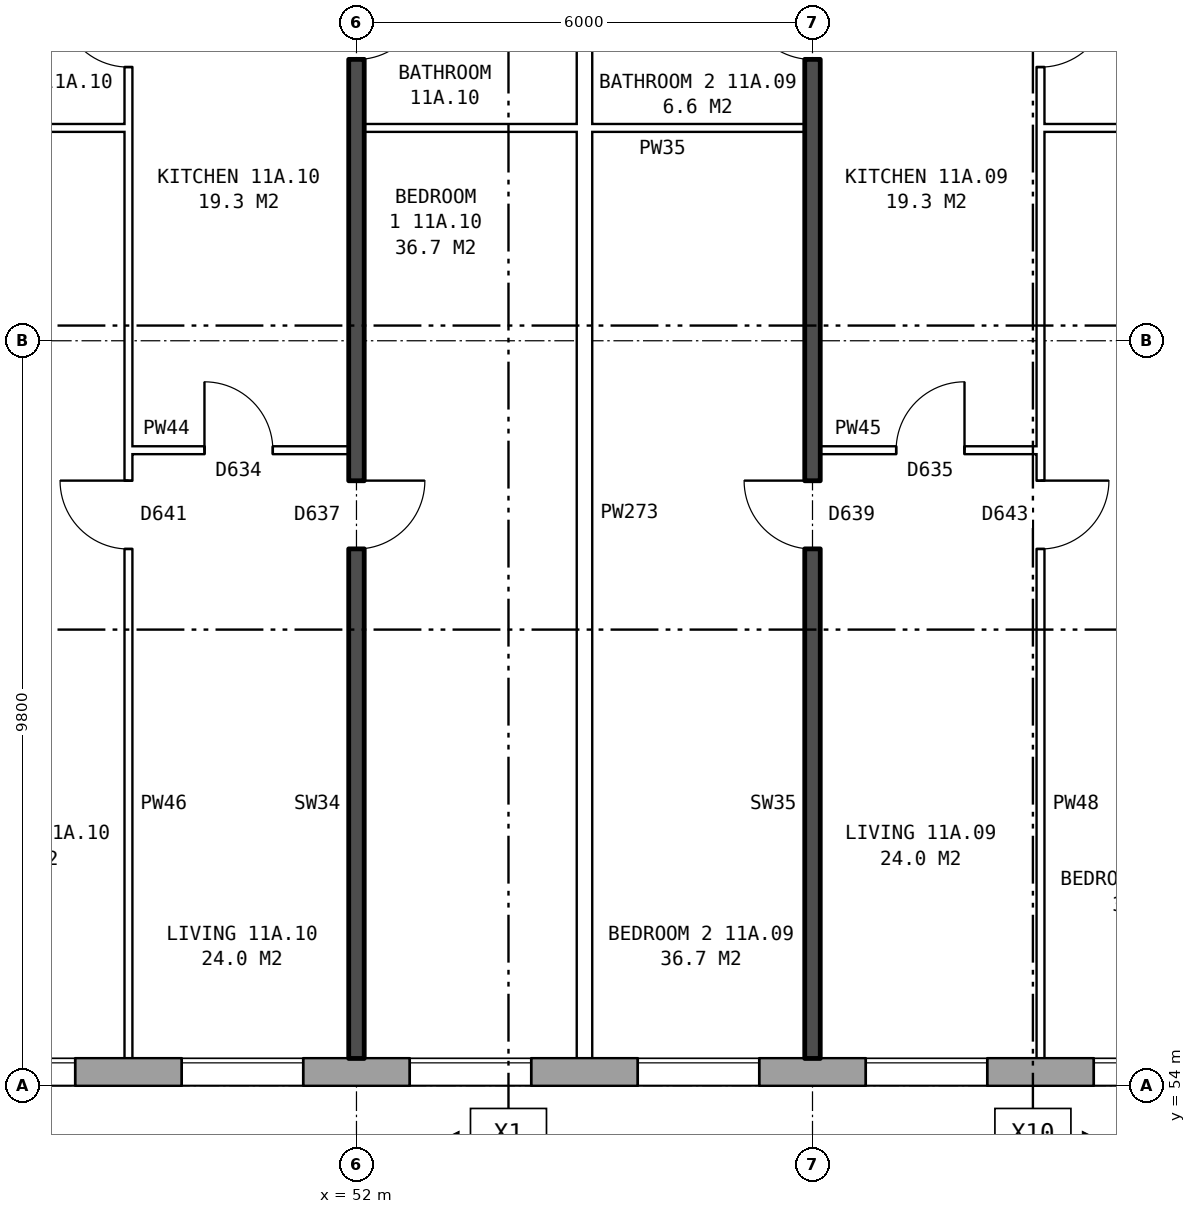
"""IFC4 building model, lengths in metres.
Left out: names, types, materials, properties, quantities, classifications, styles, units other than length and angle.
Written with IfcOpenShell. Run it as: python <this file> out.ifc"""

import sys

from ifc_helpers import new_model, si_unit, direction, frame, frame_2d, origin, place, context, subcontext, project, spatial, rectangle, extrude, element, fill, save


model = new_model("IFC4")
c1 = context("Model", 3, precision=1e-05, world=origin(), true_north=direction((0.0, 1.0)))
c2 = subcontext(c1, "Body", "Model", "MODEL_VIEW")
j1 = project(units=[si_unit("LENGTHUNIT", "METRE"), si_unit("PLANEANGLEUNIT", "RADIAN")], contexts=[c1])
p1 = place(None, origin())
s1 = spatial("IfcSite", under=j1, at=p1, CompositionType="ELEMENT")
p2 = place(p1, origin())
s2 = spatial("IfcBuilding", under=s1, at=p2, CompositionType="ELEMENT")
p3 = place(p2, frame((0.0, 0.0, 44.3)))
s3 = spatial("IfcBuildingStorey", under=s2, at=p3, CompositionType="ELEMENT", Elevation=44.3)
p4 = place(p3, frame((24.575, 54.18, 0.0), z_axis=(0.0, 0.0, 1.0), x_axis=(1.0, 0.0, 0.0)))
e1 = element("IfcWall", 1, at=p4, inside=s3, PredefinedType="STANDARD", context=c2, shape_type="SweptSolid", body=[
    extrude(rectangle(XDim=48.351, YDim=0.36, at=frame_2d((24.175, 0.0))), origin(), (0.0, 0.0, 1.0), 2.85),
])
p5 = place(p4, frame((0.65, 0.0, 0.8)))
e2 = element("IfcOpeningElement", 2, at=p5, cuts=e1, PredefinedType="OPENING", context=c2, shape_type="SweptSolid", body=[
    extrude(rectangle(XDim=1.0, YDim=0.9, at=frame_2d((0.5, 0.45))), frame((0.0, 0.19, 0.0), z_axis=(0.0, -1.0, 0.0), x_axis=(1.0, 0.0, 0.0)), (0.0, 0.0, 1.0), 0.38),
])
p6 = place(p4, frame((4.125, 0.0, 0.8)))
e3 = element("IfcOpeningElement", 3, at=p6, cuts=e1, PredefinedType="OPENING", context=c2, shape_type="SweptSolid", body=[
    extrude(rectangle(XDim=1.6, YDim=1.8, at=frame_2d((0.8, 0.9))), frame((0.0, 0.19, 0.0), z_axis=(0.0, -1.0, 0.0), x_axis=(1.0, 0.0, 0.0)), (0.0, 0.0, 1.0), 0.38),
])
p7 = place(p4, frame((7.125, 0.0, 0.8)))
e4 = element("IfcOpeningElement", 4, at=p7, cuts=e1, PredefinedType="OPENING", context=c2, shape_type="SweptSolid", body=[
    extrude(rectangle(XDim=1.6, YDim=1.8, at=frame_2d((0.8, 0.9))), frame((0.0, 0.19, 0.0), z_axis=(0.0, -1.0, 0.0), x_axis=(1.0, 0.0, 0.0)), (0.0, 0.0, 1.0), 0.38),
])
p8 = place(p4, frame((10.125, 0.0, 0.8)))
e5 = element("IfcOpeningElement", 5, at=p8, cuts=e1, PredefinedType="OPENING", context=c2, shape_type="SweptSolid", body=[
    extrude(rectangle(XDim=1.6, YDim=1.8, at=frame_2d((0.8, 0.9))), frame((0.0, 0.19, 0.0), z_axis=(0.0, -1.0, 0.0), x_axis=(1.0, 0.0, 0.0)), (0.0, 0.0, 1.0), 0.38),
])
p9 = place(p4, frame((13.125, 0.0, 0.8)))
e6 = element("IfcOpeningElement", 6, at=p9, cuts=e1, PredefinedType="OPENING", context=c2, shape_type="SweptSolid", body=[
    extrude(rectangle(XDim=1.6, YDim=1.8, at=frame_2d((0.8, 0.9))), frame((0.0, 0.19, 0.0), z_axis=(0.0, -1.0, 0.0), x_axis=(1.0, 0.0, 0.0)), (0.0, 0.0, 1.0), 0.38),
])
p10 = place(p4, frame((16.125, 0.0, 0.8)))
e7 = element("IfcOpeningElement", 7, at=p10, cuts=e1, PredefinedType="OPENING", context=c2, shape_type="SweptSolid", body=[
    extrude(rectangle(XDim=1.6, YDim=1.8, at=frame_2d((0.8, 0.9))), frame((0.0, 0.19, 0.0), z_axis=(0.0, -1.0, 0.0), x_axis=(1.0, 0.0, 0.0)), (0.0, 0.0, 1.0), 0.38),
])
p11 = place(p4, frame((19.125, 0.0, 0.8)))
e8 = element("IfcOpeningElement", 8, at=p11, cuts=e1, PredefinedType="OPENING", context=c2, shape_type="SweptSolid", body=[
    extrude(rectangle(XDim=1.6, YDim=1.8, at=frame_2d((0.8, 0.9))), frame((0.0, 0.19, 0.0), z_axis=(0.0, -1.0, 0.0), x_axis=(1.0, 0.0, 0.0)), (0.0, 0.0, 1.0), 0.38),
])
p12 = place(p4, frame((22.125, 0.0, 0.8)))
e9 = element("IfcOpeningElement", 9, at=p12, cuts=e1, PredefinedType="OPENING", context=c2, shape_type="SweptSolid", body=[
    extrude(rectangle(XDim=1.6, YDim=1.8, at=frame_2d((0.8, 0.9))), frame((0.0, 0.19, 0.0), z_axis=(0.0, -1.0, 0.0), x_axis=(1.0, 0.0, 0.0)), (0.0, 0.0, 1.0), 0.38),
])
p13 = place(p4, frame((25.125, 0.0, 0.8)))
e10 = element("IfcOpeningElement", 10, at=p13, cuts=e1, PredefinedType="OPENING", context=c2, shape_type="SweptSolid", body=[
    extrude(rectangle(XDim=1.6, YDim=1.8, at=frame_2d((0.8, 0.9))), frame((0.0, 0.19, 0.0), z_axis=(0.0, -1.0, 0.0), x_axis=(1.0, 0.0, 0.0)), (0.0, 0.0, 1.0), 0.38),
])
p14 = place(p4, frame((28.125, 0.0, 0.8)))
e11 = element("IfcOpeningElement", 11, at=p14, cuts=e1, PredefinedType="OPENING", context=c2, shape_type="SweptSolid", body=[
    extrude(rectangle(XDim=1.6, YDim=1.8, at=frame_2d((0.8, 0.9))), frame((0.0, 0.19, 0.0), z_axis=(0.0, -1.0, 0.0), x_axis=(1.0, 0.0, 0.0)), (0.0, 0.0, 1.0), 0.38),
])
p15 = place(p4, frame((31.125, 0.0, 0.8)))
e12 = element("IfcOpeningElement", 12, at=p15, cuts=e1, PredefinedType="OPENING", context=c2, shape_type="SweptSolid", body=[
    extrude(rectangle(XDim=1.6, YDim=1.8, at=frame_2d((0.8, 0.9))), frame((0.0, 0.19, 0.0), z_axis=(0.0, -1.0, 0.0), x_axis=(1.0, 0.0, 0.0)), (0.0, 0.0, 1.0), 0.38),
])
p16 = place(p4, frame((34.125, 0.0, 0.8)))
e13 = element("IfcOpeningElement", 13, at=p16, cuts=e1, PredefinedType="OPENING", context=c2, shape_type="SweptSolid", body=[
    extrude(rectangle(XDim=1.6, YDim=1.8, at=frame_2d((0.8, 0.9))), frame((0.0, 0.19, 0.0), z_axis=(0.0, -1.0, 0.0), x_axis=(1.0, 0.0, 0.0)), (0.0, 0.0, 1.0), 0.38),
])
p17 = place(p4, frame((37.125, 0.0, 0.8)))
e14 = element("IfcOpeningElement", 14, at=p17, cuts=e1, PredefinedType="OPENING", context=c2, shape_type="SweptSolid", body=[
    extrude(rectangle(XDim=1.6, YDim=1.8, at=frame_2d((0.8, 0.9))), frame((0.0, 0.19, 0.0), z_axis=(0.0, -1.0, 0.0), x_axis=(1.0, 0.0, 0.0)), (0.0, 0.0, 1.0), 0.38),
])
p18 = place(p4, frame((40.125, 0.0, 0.8)))
e15 = element("IfcOpeningElement", 15, at=p18, cuts=e1, PredefinedType="OPENING", context=c2, shape_type="SweptSolid", body=[
    extrude(rectangle(XDim=1.6, YDim=1.8, at=frame_2d((0.8, 0.9))), frame((0.0, 0.19, 0.0), z_axis=(0.0, -1.0, 0.0), x_axis=(1.0, 0.0, 0.0)), (0.0, 0.0, 1.0), 0.38),
])
p19 = place(p4, frame((43.125, 0.0, 0.8)))
e16 = element("IfcOpeningElement", 16, at=p19, cuts=e1, PredefinedType="OPENING", context=c2, shape_type="SweptSolid", body=[
    extrude(rectangle(XDim=1.6, YDim=1.8, at=frame_2d((0.8, 0.9))), frame((0.0, 0.19, 0.0), z_axis=(0.0, -1.0, 0.0), x_axis=(1.0, 0.0, 0.0)), (0.0, 0.0, 1.0), 0.38),
])
p20 = place(p4, frame((45.625, 0.0, 0.8)))
e17 = element("IfcOpeningElement", 17, at=p20, cuts=e1, PredefinedType="OPENING", context=c2, shape_type="SweptSolid", body=[
    extrude(rectangle(XDim=1.0, YDim=1.5, at=frame_2d((0.5, 0.75))), frame((0.0, 0.19, 0.0), z_axis=(0.0, -1.0, 0.0), x_axis=(1.0, 0.0, 0.0)), (0.0, 0.0, 1.0), 0.38),
])
p21 = place(p4, frame((2.0, 0.0, 0.8)))
e18 = element("IfcOpeningElement", 18, at=p21, cuts=e1, PredefinedType="OPENING", context=c2, shape_type="SweptSolid", body=[
    extrude(rectangle(XDim=1.2, YDim=1.8, at=frame_2d((0.6, 0.9))), frame((0.0, 0.19, 0.0), z_axis=(0.0, -1.0, 0.0), x_axis=(1.0, 0.0, 0.0)), (0.0, 0.0, 1.0), 0.38),
])
p22 = place(p4, frame((46.925, 0.0, 0.8)))
e19 = element("IfcOpeningElement", 19, at=p22, cuts=e1, PredefinedType="OPENING", context=c2, shape_type="SweptSolid", body=[
    extrude(rectangle(XDim=0.6, YDim=0.9, at=frame_2d((0.3, 0.45))), frame((0.0, 0.19, 0.0), z_axis=(0.0, -1.0, 0.0), x_axis=(1.0, 0.0, 0.0)), (0.0, 0.0, 1.0), 0.38),
])
p23 = place(p3, frame((49.0, 62.36, 0.0), z_axis=(0.0, 0.0, 1.0), x_axis=(1.0, 0.0, 0.0)))
e20 = element("IfcWall", 20, at=p23, inside=s3, PredefinedType="PARTITIONING", context=c2, shape_type="SweptSolid", body=[
    extrude(rectangle(XDim=2.9, YDim=0.1, at=frame_2d((1.45, 0.0))), origin(), (0.0, 0.0, 1.0), 2.85),
])
p24 = place(p23, frame((1.0, 0.0, 0.0)))
e21 = element("IfcOpeningElement", 21, at=p24, cuts=e20, PredefinedType="OPENING", context=c2, shape_type="SweptSolid", body=[
    extrude(rectangle(XDim=0.9, YDim=2.1, at=frame_2d((0.45, 1.05))), frame((0.0, 0.06, 0.0), z_axis=(0.0, -1.0, 0.0), x_axis=(1.0, 0.0, 0.0)), (0.0, 0.0, 1.0), 0.12),
])
p25 = place(p3, frame((58.1, 62.36, 0.0), z_axis=(0.0, 0.0, 1.0), x_axis=(1.0, 0.0, 0.0)))
e22 = element("IfcWall", 22, at=p25, inside=s3, PredefinedType="PARTITIONING", context=c2, shape_type="SweptSolid", body=[
    extrude(rectangle(XDim=2.9, YDim=0.1, at=frame_2d((1.45, 0.0))), origin(), (0.0, 0.0, 1.0), 2.85),
])
p26 = place(p25, frame((1.0, 0.0, 0.0)))
e23 = element("IfcOpeningElement", 23, at=p26, cuts=e22, PredefinedType="OPENING", context=c2, shape_type="SweptSolid", body=[
    extrude(rectangle(XDim=0.9, YDim=2.1, at=frame_2d((0.45, 1.05))), frame((0.0, 0.06, 0.0), z_axis=(0.0, -1.0, 0.0), x_axis=(1.0, 0.0, 0.0)), (0.0, 0.0, 1.0), 0.12),
])
p27 = place(p3, frame((46.1, 66.6, 0.0), z_axis=(0.0, 0.0, 1.0), x_axis=(1.0, 0.0, 0.0)))
e24 = element("IfcWall", 24, at=p27, inside=s3, PredefinedType="PARTITIONING", context=c2, shape_type="SweptSolid", body=[
    extrude(rectangle(XDim=2.9, YDim=0.1, at=frame_2d((1.45, 0.0))), origin(), (0.0, 0.0, 1.0), 2.85),
])
p28 = place(p3, frame((52.1, 66.6, 0.0), z_axis=(0.0, 0.0, 1.0), x_axis=(1.0, 0.0, 0.0)))
e25 = element("IfcWall", 25, at=p28, inside=s3, PredefinedType="PARTITIONING", context=c2, shape_type="SweptSolid", body=[
    extrude(rectangle(XDim=5.8, YDim=0.1, at=frame_2d((2.9, 0.0))), origin(), (0.0, 0.0, 1.0), 2.85),
])
p29 = place(p3, frame((61.0, 66.6, 0.0), z_axis=(0.0, 0.0, 1.0), x_axis=(1.0, 0.0, 0.0)))
e26 = element("IfcWall", 26, at=p29, inside=s3, PredefinedType="PARTITIONING", context=c2, shape_type="SweptSolid", body=[
    extrude(rectangle(XDim=2.64, YDim=0.1, at=frame_2d((1.32, 0.0))), origin(), (0.0, 0.0, 1.0), 2.85),
])
p30 = place(p3, frame((49.0, 54.36, 0.0), z_axis=(0.0, 0.0, 1.0), x_axis=(0.0, 1.0, 0.0)))
e27 = element("IfcWall", 27, at=p30, inside=s3, PredefinedType="PARTITIONING", context=c2, shape_type="SweptSolid", body=[
    extrude(rectangle(XDim=14.34, YDim=0.1, at=frame_2d((7.17, 0.0))), origin(), (0.0, 0.0, 1.0), 2.85),
])
p31 = place(p30, frame((6.7, 0.0, 0.0)))
e28 = element("IfcOpeningElement", 28, at=p31, cuts=e27, PredefinedType="OPENING", context=c2, shape_type="SweptSolid", body=[
    extrude(rectangle(XDim=0.9, YDim=2.1, at=frame_2d((0.45, 1.05))), frame((0.0, 0.06, 0.0), z_axis=(0.0, -1.0, 0.0), x_axis=(1.0, 0.0, 0.0)), (0.0, 0.0, 1.0), 0.12),
])
p32 = place(p30, frame((13.04, 0.0, 0.0)))
e29 = element("IfcOpeningElement", 29, at=p32, cuts=e27, PredefinedType="OPENING", context=c2, shape_type="SweptSolid", body=[
    extrude(rectangle(XDim=0.9, YDim=2.1, at=frame_2d((0.45, 1.05))), frame((0.0, 0.06, 0.0), z_axis=(0.0, -1.0, 0.0), x_axis=(1.0, 0.0, 0.0)), (0.0, 0.0, 1.0), 0.12),
])
p33 = place(p3, frame((52.0, 54.36, 0.0), z_axis=(0.0, 0.0, 1.0), x_axis=(0.0, 1.0, 0.0)))
e30 = element("IfcWall", 30, at=p33, inside=s3, PredefinedType="SOLIDWALL", context=c2, shape_type="SweptSolid", body=[
    extrude(rectangle(XDim=14.44, YDim=0.2, at=frame_2d((7.22, 0.0))), origin(), (0.0, 0.0, 1.0), 2.85),
])
p34 = place(p33, frame((6.7, 0.0, 0.0)))
e31 = element("IfcOpeningElement", 31, at=p34, cuts=e30, PredefinedType="OPENING", context=c2, shape_type="SweptSolid", body=[
    extrude(rectangle(XDim=0.9, YDim=2.1, at=frame_2d((0.45, 1.05))), frame((0.0, 0.11, 0.0), z_axis=(0.0, -1.0, 0.0), x_axis=(1.0, 0.0, 0.0)), (0.0, 0.0, 1.0), 0.22),
])
p35 = place(p33, frame((13.14, 0.0, 0.0)))
e32 = element("IfcOpeningElement", 32, at=p35, cuts=e30, PredefinedType="OPENING", context=c2, shape_type="SweptSolid", body=[
    extrude(rectangle(XDim=0.9, YDim=2.1, at=frame_2d((0.45, 1.05))), frame((0.0, 0.11, 0.0), z_axis=(0.0, -1.0, 0.0), x_axis=(1.0, 0.0, 0.0)), (0.0, 0.0, 1.0), 0.22),
])
p36 = place(p3, frame((55.0, 54.36, 0.0), z_axis=(0.0, 0.0, 1.0), x_axis=(0.0, 1.0, 0.0)))
e33 = element("IfcWall", 33, at=p36, inside=s3, PredefinedType="PARTITIONING", context=c2, shape_type="SweptSolid", body=[
    extrude(rectangle(XDim=14.34, YDim=0.2, at=frame_2d((7.17, 0.0))), origin(), (0.0, 0.0, 1.0), 2.85),
])
p37 = place(p3, frame((58.0, 54.36, 0.0), z_axis=(0.0, 0.0, 1.0), x_axis=(0.0, 1.0, 0.0)))
e34 = element("IfcWall", 34, at=p37, inside=s3, PredefinedType="SOLIDWALL", context=c2, shape_type="SweptSolid", body=[
    extrude(rectangle(XDim=14.44, YDim=0.2, at=frame_2d((7.22, 0.0))), origin(), (0.0, 0.0, 1.0), 2.85),
])
p38 = place(p37, frame((6.7, 0.0, 0.0)))
e35 = element("IfcOpeningElement", 35, at=p38, cuts=e34, PredefinedType="OPENING", context=c2, shape_type="SweptSolid", body=[
    extrude(rectangle(XDim=0.9, YDim=2.1, at=frame_2d((0.45, 1.05))), frame((0.0, 0.11, 0.0), z_axis=(0.0, -1.0, 0.0), x_axis=(1.0, 0.0, 0.0)), (0.0, 0.0, 1.0), 0.22),
])
p39 = place(p37, frame((13.14, 0.0, 0.0)))
e36 = element("IfcOpeningElement", 36, at=p39, cuts=e34, PredefinedType="OPENING", context=c2, shape_type="SweptSolid", body=[
    extrude(rectangle(XDim=0.9, YDim=2.1, at=frame_2d((0.45, 1.05))), frame((0.0, 0.11, 0.0), z_axis=(0.0, -1.0, 0.0), x_axis=(1.0, 0.0, 0.0)), (0.0, 0.0, 1.0), 0.22),
])
p40 = place(p3, frame((61.0, 54.36, 0.0), z_axis=(0.0, 0.0, 1.0), x_axis=(0.0, 1.0, 0.0)))
e37 = element("IfcWall", 37, at=p40, inside=s3, PredefinedType="PARTITIONING", context=c2, shape_type="SweptSolid", body=[
    extrude(rectangle(XDim=14.34, YDim=0.1, at=frame_2d((7.17, 0.0))), origin(), (0.0, 0.0, 1.0), 2.85),
])
p41 = place(p40, frame((6.7, 0.0, 0.0)))
e38 = element("IfcOpeningElement", 38, at=p41, cuts=e37, PredefinedType="OPENING", context=c2, shape_type="SweptSolid", body=[
    extrude(rectangle(XDim=0.9, YDim=2.1, at=frame_2d((0.45, 1.05))), frame((0.0, 0.06, 0.0), z_axis=(0.0, -1.0, 0.0), x_axis=(1.0, 0.0, 0.0)), (0.0, 0.0, 1.0), 0.12),
])
p42 = place(p40, frame((13.04, 0.0, 0.0)))
e39 = element("IfcOpeningElement", 39, at=p42, cuts=e37, PredefinedType="OPENING", context=c2, shape_type="SweptSolid", body=[
    extrude(rectangle(XDim=0.9, YDim=2.1, at=frame_2d((0.45, 1.05))), frame((0.0, 0.06, 0.0), z_axis=(0.0, -1.0, 0.0), x_axis=(1.0, 0.0, 0.0)), (0.0, 0.0, 1.0), 0.12),
])
p43 = place(p12, origin())
e40 = element("IfcWindow", 40, at=p43, inside=s3, PartitioningType="SINGLE_PANEL", PredefinedType="WINDOW", context=c2, shape_type="SweptSolid", body=[
    extrude(rectangle(XDim=1.6, YDim=1.8, at=frame_2d((0.8, 0.9))), frame((0.0, 0.15, 0.0), z_axis=(0.0, -1.0, 0.0), x_axis=(1.0, 0.0, 0.0)), (0.0, 0.0, 1.0), 0.06),
])
fill(e9, e40)
p44 = place(p13, origin())
e41 = element("IfcWindow", 41, at=p44, inside=s3, PartitioningType="SINGLE_PANEL", PredefinedType="WINDOW", context=c2, shape_type="SweptSolid", body=[
    extrude(rectangle(XDim=1.6, YDim=1.8, at=frame_2d((0.8, 0.9))), frame((0.0, 0.15, 0.0), z_axis=(0.0, -1.0, 0.0), x_axis=(1.0, 0.0, 0.0)), (0.0, 0.0, 1.0), 0.06),
])
fill(e10, e41)
p45 = place(p14, origin())
e42 = element("IfcWindow", 42, at=p45, inside=s3, PartitioningType="SINGLE_PANEL", PredefinedType="WINDOW", context=c2, shape_type="SweptSolid", body=[
    extrude(rectangle(XDim=1.6, YDim=1.8, at=frame_2d((0.8, 0.9))), frame((0.0, 0.15, 0.0), z_axis=(0.0, -1.0, 0.0), x_axis=(1.0, 0.0, 0.0)), (0.0, 0.0, 1.0), 0.06),
])
fill(e11, e42)
p46 = place(p15, origin())
e43 = element("IfcWindow", 43, at=p46, inside=s3, PartitioningType="SINGLE_PANEL", PredefinedType="WINDOW", context=c2, shape_type="SweptSolid", body=[
    extrude(rectangle(XDim=1.6, YDim=1.8, at=frame_2d((0.8, 0.9))), frame((0.0, 0.15, 0.0), z_axis=(0.0, -1.0, 0.0), x_axis=(1.0, 0.0, 0.0)), (0.0, 0.0, 1.0), 0.06),
])
fill(e12, e43)
p47 = place(p16, origin())
e44 = element("IfcWindow", 44, at=p47, inside=s3, PartitioningType="SINGLE_PANEL", PredefinedType="WINDOW", context=c2, shape_type="SweptSolid", body=[
    extrude(rectangle(XDim=1.6, YDim=1.8, at=frame_2d((0.8, 0.9))), frame((0.0, 0.15, 0.0), z_axis=(0.0, -1.0, 0.0), x_axis=(1.0, 0.0, 0.0)), (0.0, 0.0, 1.0), 0.06),
])
fill(e13, e44)
p48 = place(p17, origin())
e45 = element("IfcWindow", 45, at=p48, inside=s3, PartitioningType="SINGLE_PANEL", PredefinedType="WINDOW", context=c2, shape_type="SweptSolid", body=[
    extrude(rectangle(XDim=1.6, YDim=1.8, at=frame_2d((0.8, 0.9))), frame((0.0, 0.15, 0.0), z_axis=(0.0, -1.0, 0.0), x_axis=(1.0, 0.0, 0.0)), (0.0, 0.0, 1.0), 0.06),
])
fill(e14, e45)
p49 = place(p41, frame((0.9, 0.0, 0.0), z_axis=(0.0, 0.0, 1.0), x_axis=(-1.0, 0.0, 0.0)))
e46 = element("IfcDoor", 46, at=p49, inside=s3, OperationType="SINGLE_SWING_LEFT", PredefinedType="DOOR", context=c2, shape_type="SweptSolid", body=[
    extrude(rectangle(XDim=0.9, YDim=2.1, at=frame_2d((0.45, 1.05))), frame((0.0, 0.025, 0.0), z_axis=(0.0, -1.0, 0.0), x_axis=(1.0, 0.0, 0.0)), (0.0, 0.0, 1.0), 0.05),
])
fill(e38, e46)
p50 = place(p38, origin())
e47 = element("IfcDoor", 47, at=p50, inside=s3, OperationType="SINGLE_SWING_RIGHT", PredefinedType="DOOR", context=c2, shape_type="SweptSolid", body=[
    extrude(rectangle(XDim=0.9, YDim=2.1, at=frame_2d((0.45, 1.05))), frame((0.0, 0.025, 0.0), z_axis=(0.0, -1.0, 0.0), x_axis=(1.0, 0.0, 0.0)), (0.0, 0.0, 1.0), 0.05),
])
fill(e35, e47)
p51 = place(p26, origin())
e48 = element("IfcDoor", 48, at=p51, inside=s3, OperationType="SINGLE_SWING_RIGHT", PredefinedType="DOOR", context=c2, shape_type="SweptSolid", body=[
    extrude(rectangle(XDim=0.9, YDim=2.1, at=frame_2d((0.45, 1.05))), frame((0.0, 0.025, 0.0), z_axis=(0.0, -1.0, 0.0), x_axis=(1.0, 0.0, 0.0)), (0.0, 0.0, 1.0), 0.05),
])
fill(e23, e48)
p52 = place(p42, frame((0.9, 0.0, 0.0), z_axis=(0.0, 0.0, 1.0), x_axis=(-1.0, 0.0, 0.0)))
e49 = element("IfcDoor", 49, at=p52, inside=s3, OperationType="SINGLE_SWING_LEFT", PredefinedType="DOOR", context=c2, shape_type="SweptSolid", body=[
    extrude(rectangle(XDim=0.9, YDim=2.1, at=frame_2d((0.45, 1.05))), frame((0.0, 0.025, 0.0), z_axis=(0.0, -1.0, 0.0), x_axis=(1.0, 0.0, 0.0)), (0.0, 0.0, 1.0), 0.05),
])
fill(e39, e49)
p53 = place(p39, origin())
e50 = element("IfcDoor", 50, at=p53, inside=s3, OperationType="SINGLE_SWING_RIGHT", PredefinedType="DOOR", context=c2, shape_type="SweptSolid", body=[
    extrude(rectangle(XDim=0.9, YDim=2.1, at=frame_2d((0.45, 1.05))), frame((0.0, 0.025, 0.0), z_axis=(0.0, -1.0, 0.0), x_axis=(1.0, 0.0, 0.0)), (0.0, 0.0, 1.0), 0.05),
])
fill(e36, e50)
p54 = place(p34, frame((0.9, 0.0, 0.0), z_axis=(0.0, 0.0, 1.0), x_axis=(-1.0, 0.0, 0.0)))
e51 = element("IfcDoor", 51, at=p54, inside=s3, OperationType="SINGLE_SWING_LEFT", PredefinedType="DOOR", context=c2, shape_type="SweptSolid", body=[
    extrude(rectangle(XDim=0.9, YDim=2.1, at=frame_2d((0.45, 1.05))), frame((0.0, 0.025, 0.0), z_axis=(0.0, -1.0, 0.0), x_axis=(1.0, 0.0, 0.0)), (0.0, 0.0, 1.0), 0.05),
])
fill(e31, e51)
p55 = place(p31, origin())
e52 = element("IfcDoor", 52, at=p55, inside=s3, OperationType="SINGLE_SWING_RIGHT", PredefinedType="DOOR", context=c2, shape_type="SweptSolid", body=[
    extrude(rectangle(XDim=0.9, YDim=2.1, at=frame_2d((0.45, 1.05))), frame((0.0, 0.025, 0.0), z_axis=(0.0, -1.0, 0.0), x_axis=(1.0, 0.0, 0.0)), (0.0, 0.0, 1.0), 0.05),
])
fill(e28, e52)
p56 = place(p24, origin())
e53 = element("IfcDoor", 53, at=p56, inside=s3, OperationType="SINGLE_SWING_LEFT", PredefinedType="DOOR", context=c2, shape_type="SweptSolid", body=[
    extrude(rectangle(XDim=0.9, YDim=2.1, at=frame_2d((0.45, 1.05))), frame((0.0, 0.025, 0.0), z_axis=(0.0, -1.0, 0.0), x_axis=(1.0, 0.0, 0.0)), (0.0, 0.0, 1.0), 0.05),
])
fill(e21, e53)
p57 = place(p35, frame((0.9, 0.0, 0.0), z_axis=(0.0, 0.0, 1.0), x_axis=(-1.0, 0.0, 0.0)))
e54 = element("IfcDoor", 54, at=p57, inside=s3, OperationType="SINGLE_SWING_LEFT", PredefinedType="DOOR", context=c2, shape_type="SweptSolid", body=[
    extrude(rectangle(XDim=0.9, YDim=2.1, at=frame_2d((0.45, 1.05))), frame((0.0, 0.025, 0.0), z_axis=(0.0, -1.0, 0.0), x_axis=(1.0, 0.0, 0.0)), (0.0, 0.0, 1.0), 0.05),
])
fill(e32, e54)
p58 = place(p32, origin())
e55 = element("IfcDoor", 55, at=p58, inside=s3, OperationType="SINGLE_SWING_RIGHT", PredefinedType="DOOR", context=c2, shape_type="SweptSolid", body=[
    extrude(rectangle(XDim=0.9, YDim=2.1, at=frame_2d((0.45, 1.05))), frame((0.0, 0.025, 0.0), z_axis=(0.0, -1.0, 0.0), x_axis=(1.0, 0.0, 0.0)), (0.0, 0.0, 1.0), 0.05),
])
fill(e29, e55)
save(model, sys.argv[1])
